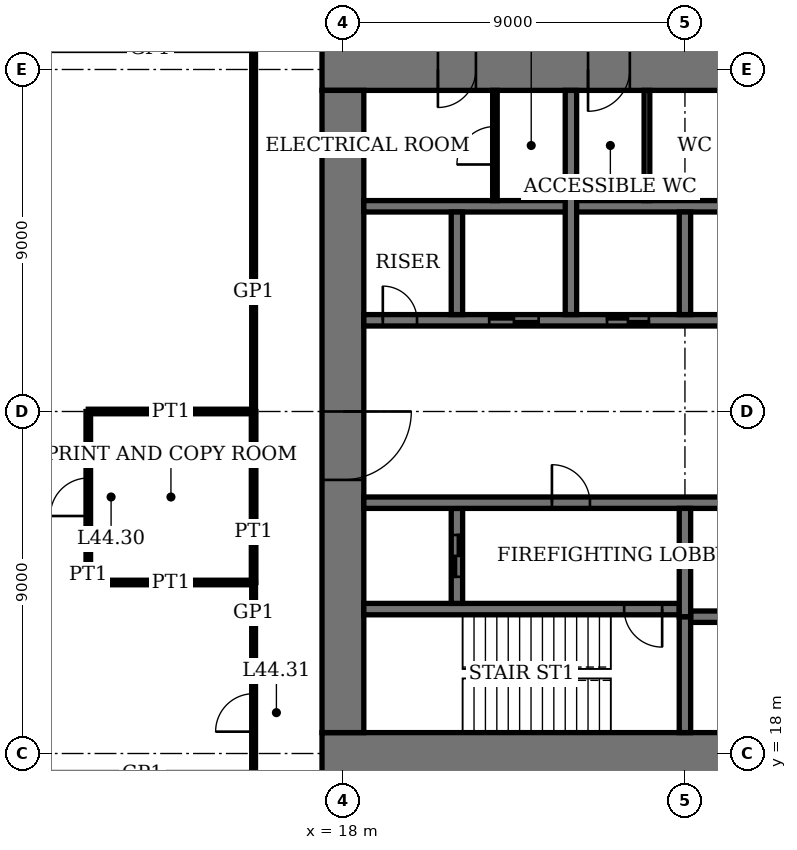
"""IFC4 building model, lengths in metres.
Left out: names, types, materials, properties, quantities, classifications, styles, units other than length and angle.
Written with IfcOpenShell. Run it as: python <this file> out.ifc"""

import sys

from ifc_helpers import new_model, si_unit, direction, frame, frame_2d, origin, place, context, subcontext, project, spatial, rectangle, extrude, element, fill, save


model = new_model("IFC4")
c1 = context("Model", 3, precision=1e-05, world=origin(), true_north=direction((0.0, 1.0)))
c2 = subcontext(c1, "Body", "Model", "MODEL_VIEW")
j1 = project(units=[si_unit("LENGTHUNIT", "METRE"), si_unit("PLANEANGLEUNIT", "RADIAN")], contexts=[c1])
p1 = place(None, origin())
s1 = spatial("IfcSite", under=j1, at=p1, CompositionType="ELEMENT")
p2 = place(p1, origin())
s2 = spatial("IfcBuilding", under=s1, at=p2, CompositionType="ELEMENT")
p3 = place(p2, frame((0.0, 0.0, 182.2)))
s3 = spatial("IfcBuildingStorey", under=s2, at=p3, CompositionType="ELEMENT", Elevation=182.2)
p4 = place(p3, frame((17.45, 18.0, 0.0), z_axis=(0.0, 0.0, 1.0), x_axis=(1.0, 0.0, 0.0)))
e1 = element("IfcWall", 1, at=p4, inside=s3, PredefinedType="SHEAR", context=c2, shape_type="SweptSolid", body=[
    extrude(rectangle(XDim=28.1, YDim=1.1, at=frame_2d((14.05, 0.0))), origin(), (0.0, 0.0, 1.0), 4.0),
])
p5 = place(p4, frame((11.55, 0.0, 0.0)))
e2 = element("IfcOpeningElement", 2, at=p5, cuts=e1, PredefinedType="OPENING", context=c2, shape_type="SweptSolid", body=[
    extrude(rectangle(XDim=1.0, YDim=2.4, at=frame_2d((0.5, 1.2))), frame((0.0, 0.56, 0.0), z_axis=(0.0, -1.0, 0.0), x_axis=(1.0, 0.0, 0.0)), (0.0, 0.0, 1.0), 1.12),
])
p6 = place(p4, frame((16.55, 0.0, 0.0)))
e3 = element("IfcOpeningElement", 3, at=p6, cuts=e1, PredefinedType="OPENING", context=c2, shape_type="SweptSolid", body=[
    extrude(rectangle(XDim=1.0, YDim=2.4, at=frame_2d((0.5, 1.2))), frame((0.0, 0.56, 0.0), z_axis=(0.0, -1.0, 0.0), x_axis=(1.0, 0.0, 0.0)), (0.0, 0.0, 1.0), 1.12),
])
p7 = place(p4, frame((20.0, 0.0, 0.0)))
e4 = element("IfcOpeningElement", 4, at=p7, cuts=e1, PredefinedType="OPENING", context=c2, shape_type="SweptSolid", body=[
    extrude(rectangle(XDim=1.1, YDim=2.4, at=frame_2d((0.55, 1.2))), frame((0.0, 0.56, 0.0), z_axis=(0.0, -1.0, 0.0), x_axis=(1.0, 0.0, 0.0)), (0.0, 0.0, 1.0), 1.12),
])
p8 = place(p4, frame((24.05, 0.0, 0.0)))
e5 = element("IfcOpeningElement", 5, at=p8, cuts=e1, PredefinedType="OPENING", context=c2, shape_type="SweptSolid", body=[
    extrude(rectangle(XDim=1.0, YDim=2.4, at=frame_2d((0.5, 1.2))), frame((0.0, 0.56, 0.0), z_axis=(0.0, -1.0, 0.0), x_axis=(1.0, 0.0, 0.0)), (0.0, 0.0, 1.0), 1.12),
])
p9 = place(p3, frame((45.55, 36.0, 0.0), z_axis=(0.0, 0.0, 1.0), x_axis=(-1.0, 0.0, 0.0)))
e6 = element("IfcWall", 6, at=p9, inside=s3, PredefinedType="SHEAR", context=c2, shape_type="SweptSolid", body=[
    extrude(rectangle(XDim=28.1, YDim=1.1, at=frame_2d((14.05, 0.0))), origin(), (0.0, 0.0, 1.0), 4.0),
])
p10 = place(p9, frame((11.55, 0.0, 0.0)))
e7 = element("IfcOpeningElement", 7, at=p10, cuts=e6, PredefinedType="OPENING", context=c2, shape_type="SweptSolid", body=[
    extrude(rectangle(XDim=1.0, YDim=2.4, at=frame_2d((0.5, 1.2))), frame((0.0, 0.56, 0.0), z_axis=(0.0, -1.0, 0.0), x_axis=(1.0, 0.0, 0.0)), (0.0, 0.0, 1.0), 1.12),
])
p11 = place(p9, frame((16.55, 0.0, 0.0)))
e8 = element("IfcOpeningElement", 8, at=p11, cuts=e6, PredefinedType="OPENING", context=c2, shape_type="SweptSolid", body=[
    extrude(rectangle(XDim=1.0, YDim=2.4, at=frame_2d((0.5, 1.2))), frame((0.0, 0.56, 0.0), z_axis=(0.0, -1.0, 0.0), x_axis=(1.0, 0.0, 0.0)), (0.0, 0.0, 1.0), 1.12),
])
p12 = place(p9, frame((20.0, 0.0, 0.0)))
e9 = element("IfcOpeningElement", 9, at=p12, cuts=e6, PredefinedType="OPENING", context=c2, shape_type="SweptSolid", body=[
    extrude(rectangle(XDim=1.1, YDim=2.4, at=frame_2d((0.55, 1.2))), frame((0.0, 0.56, 0.0), z_axis=(0.0, -1.0, 0.0), x_axis=(1.0, 0.0, 0.0)), (0.0, 0.0, 1.0), 1.12),
])
p13 = place(p9, frame((24.05, 0.0, 0.0)))
e10 = element("IfcOpeningElement", 10, at=p13, cuts=e6, PredefinedType="OPENING", context=c2, shape_type="SweptSolid", body=[
    extrude(rectangle(XDim=1.0, YDim=2.4, at=frame_2d((0.5, 1.2))), frame((0.0, 0.56, 0.0), z_axis=(0.0, -1.0, 0.0), x_axis=(1.0, 0.0, 0.0)), (0.0, 0.0, 1.0), 1.12),
])
p14 = place(p3, frame((18.0, 35.45, 0.0), z_axis=(0.0, 0.0, 1.0), x_axis=(0.0, -1.0, 0.0)))
e11 = element("IfcWall", 11, at=p14, inside=s3, PredefinedType="SHEAR", context=c2, shape_type="SweptSolid", body=[
    extrude(rectangle(XDim=16.9, YDim=1.1, at=frame_2d((8.45, 0.0))), origin(), (0.0, 0.0, 1.0), 4.0),
])
p15 = place(p14, frame((8.45, 0.0, 0.0)))
e12 = element("IfcOpeningElement", 12, at=p15, cuts=e11, PredefinedType="OPENING", context=c2, shape_type="SweptSolid", body=[
    extrude(rectangle(XDim=1.8, YDim=2.4, at=frame_2d((0.9, 1.2))), frame((0.0, 0.56, 0.0), z_axis=(0.0, -1.0, 0.0), x_axis=(1.0, 0.0, 0.0)), (0.0, 0.0, 1.0), 1.12),
])
p16 = place(p3, frame((18.55, 21.8, 0.0), z_axis=(0.0, 0.0, 1.0), x_axis=(1.0, 0.0, 0.0)))
e13 = element("IfcWall", 13, at=p16, inside=s3, PredefinedType="SHEAR", context=c2, shape_type="SweptSolid", body=[
    extrude(rectangle(XDim=8.3, YDim=0.3, at=frame_2d((4.15, 0.0))), origin(), (0.0, 0.0, 1.0), 4.0),
])
p17 = place(p16, frame((6.85, 0.0, 0.0)))
e14 = element("IfcOpeningElement", 14, at=p17, cuts=e13, PredefinedType="OPENING", context=c2, shape_type="SweptSolid", body=[
    extrude(rectangle(XDim=1.0, YDim=2.4, at=frame_2d((0.5, 1.2))), frame((0.0, 0.16, 0.0), z_axis=(0.0, -1.0, 0.0), x_axis=(1.0, 0.0, 0.0)), (0.0, 0.0, 1.0), 0.32),
])
p18 = place(p3, frame((27.0, 18.55, 0.0), z_axis=(0.0, 0.0, 1.0), x_axis=(0.0, 1.0, 0.0)))
e15 = element("IfcWall", 15, at=p18, inside=s3, PredefinedType="SHEAR", context=c2, shape_type="SweptSolid", body=[
    extrude(rectangle(XDim=3.05, YDim=0.3, at=frame_2d((1.525, 0.0))), origin(), (0.0, 0.0, 1.0), 4.0),
])
p19 = place(p3, frame((21.0, 21.95, 0.0), z_axis=(0.0, 0.0, 1.0), x_axis=(0.0, 1.0, 0.0)))
e16 = element("IfcWall", 16, at=p19, inside=s3, PredefinedType="SHEAR", context=c2, shape_type="SweptSolid", body=[
    extrude(rectangle(XDim=2.5, YDim=0.3, at=frame_2d((1.25, 0.0))), origin(), (0.0, 0.0, 1.0), 4.0),
])
p20 = place(p19, frame((0.7, 0.0, 0.0)))
e17 = element("IfcOpeningElement", 17, at=p20, cuts=e16, PredefinedType="OPENING", context=c2, shape_type="SweptSolid", body=[
    extrude(rectangle(XDim=1.1, YDim=2.4, at=frame_2d((0.55, 1.2))), frame((0.0, 0.16, 0.0), z_axis=(0.0, -1.0, 0.0), x_axis=(1.0, 0.0, 0.0)), (0.0, 0.0, 1.0), 0.32),
])
p21 = place(p3, frame((18.55, 24.6, 0.0), z_axis=(0.0, 0.0, 1.0), x_axis=(1.0, 0.0, 0.0)))
e18 = element("IfcWall", 18, at=p21, inside=s3, PredefinedType="SHEAR", context=c2, shape_type="SweptSolid", body=[
    extrude(rectangle(XDim=25.9, YDim=0.3, at=frame_2d((12.95, 0.0))), origin(), (0.0, 0.0, 1.0), 4.0),
])
p22 = place(p21, frame((4.95, 0.0, 0.0)))
e19 = element("IfcOpeningElement", 19, at=p22, cuts=e18, PredefinedType="OPENING", context=c2, shape_type="SweptSolid", body=[
    extrude(rectangle(XDim=1.0, YDim=2.4, at=frame_2d((0.5, 1.2))), frame((0.0, 0.16, 0.0), z_axis=(0.0, -1.0, 0.0), x_axis=(1.0, 0.0, 0.0)), (0.0, 0.0, 1.0), 0.32),
])
p23 = place(p21, frame((24.5, 0.0, 0.0)))
e20 = element("IfcOpeningElement", 20, at=p23, cuts=e18, PredefinedType="OPENING", context=c2, shape_type="SweptSolid", body=[
    extrude(rectangle(XDim=0.9, YDim=2.1, at=frame_2d((0.45, 1.05))), frame((0.0, 0.16, 0.0), z_axis=(0.0, -1.0, 0.0), x_axis=(1.0, 0.0, 0.0)), (0.0, 0.0, 1.0), 0.32),
])
p24 = place(p21, frame((21.3, 0.0, 0.0)))
e21 = element("IfcOpeningElement", 21, at=p24, cuts=e18, PredefinedType="OPENING", context=c2, shape_type="SweptSolid", body=[
    extrude(rectangle(XDim=1.3, YDim=2.4, at=frame_2d((0.65, 1.2))), frame((0.0, 0.16, 0.0), z_axis=(0.0, -1.0, 0.0), x_axis=(1.0, 0.0, 0.0)), (0.0, 0.0, 1.0), 0.32),
])
p25 = place(p3, frame((18.55, 29.4, 0.0), z_axis=(0.0, 0.0, 1.0), x_axis=(1.0, 0.0, 0.0)))
e22 = element("IfcWall", 22, at=p25, inside=s3, PredefinedType="SHEAR", context=c2, shape_type="SweptSolid", body=[
    extrude(rectangle(XDim=25.9, YDim=0.3, at=frame_2d((12.95, 0.0))), origin(), (0.0, 0.0, 1.0), 4.0),
])
p26 = place(p25, frame((19.95, 0.0, 0.0)))
e23 = element("IfcOpeningElement", 23, at=p26, cuts=e22, PredefinedType="OPENING", context=c2, shape_type="SweptSolid", body=[
    extrude(rectangle(XDim=1.0, YDim=2.4, at=frame_2d((0.5, 1.2))), frame((0.0, 0.16, 0.0), z_axis=(0.0, -1.0, 0.0), x_axis=(1.0, 0.0, 0.0)), (0.0, 0.0, 1.0), 0.32),
])
p27 = place(p25, frame((0.5, 0.0, 0.0)))
e24 = element("IfcOpeningElement", 24, at=p27, cuts=e22, PredefinedType="OPENING", context=c2, shape_type="SweptSolid", body=[
    extrude(rectangle(XDim=0.9, YDim=2.1, at=frame_2d((0.45, 1.05))), frame((0.0, 0.16, 0.0), z_axis=(0.0, -1.0, 0.0), x_axis=(1.0, 0.0, 0.0)), (0.0, 0.0, 1.0), 0.32),
])
p28 = place(p25, frame((15.45, 0.0, 0.0)))
e25 = element("IfcOpeningElement", 25, at=p28, cuts=e22, PredefinedType="OPENING", context=c2, shape_type="SweptSolid", body=[
    extrude(rectangle(XDim=1.0, YDim=2.4, at=frame_2d((0.5, 1.2))), frame((0.0, 0.16, 0.0), z_axis=(0.0, -1.0, 0.0), x_axis=(1.0, 0.0, 0.0)), (0.0, 0.0, 1.0), 0.32),
])
p29 = place(p25, frame((12.45, 0.0, 0.0)))
e26 = element("IfcOpeningElement", 26, at=p29, cuts=e22, PredefinedType="OPENING", context=c2, shape_type="SweptSolid", body=[
    extrude(rectangle(XDim=1.0, YDim=2.4, at=frame_2d((0.5, 1.2))), frame((0.0, 0.16, 0.0), z_axis=(0.0, -1.0, 0.0), x_axis=(1.0, 0.0, 0.0)), (0.0, 0.0, 1.0), 0.32),
])
p30 = place(p25, frame((9.4, 0.0, 0.0)))
e27 = element("IfcOpeningElement", 27, at=p30, cuts=e22, PredefinedType="OPENING", context=c2, shape_type="SweptSolid", body=[
    extrude(rectangle(XDim=1.1, YDim=2.4, at=frame_2d((0.55, 1.2))), frame((0.0, 0.16, 0.0), z_axis=(0.0, -1.0, 0.0), x_axis=(1.0, 0.0, 0.0)), (0.0, 0.0, 1.0), 0.32),
])
p31 = place(p25, frame((6.4, 0.0, 0.0)))
e28 = element("IfcOpeningElement", 28, at=p31, cuts=e22, PredefinedType="OPENING", context=c2, shape_type="SweptSolid", body=[
    extrude(rectangle(XDim=1.1, YDim=2.4, at=frame_2d((0.55, 1.2))), frame((0.0, 0.16, 0.0), z_axis=(0.0, -1.0, 0.0), x_axis=(1.0, 0.0, 0.0)), (0.0, 0.0, 1.0), 0.32),
])
p32 = place(p25, frame((3.3, 0.0, 0.0)))
e29 = element("IfcOpeningElement", 29, at=p32, cuts=e22, PredefinedType="OPENING", context=c2, shape_type="SweptSolid", body=[
    extrude(rectangle(XDim=1.3, YDim=2.4, at=frame_2d((0.65, 1.2))), frame((0.0, 0.16, 0.0), z_axis=(0.0, -1.0, 0.0), x_axis=(1.0, 0.0, 0.0)), (0.0, 0.0, 1.0), 0.32),
])
for number, where, z_axis, x_axis in (
    (30, (27.15, 21.6, 0.0), (0.0, 0.0, 1.0), (1.0, 0.0, 0.0)),
    (31, (18.55, 32.4, 0.0), (0.0, 0.0, 1.0), (1.0, 0.0, 0.0)),
):
    element("IfcWall", number, at=place(p3, frame(where, z_axis=z_axis, x_axis=x_axis)), inside=s3, PredefinedType="SHEAR", context=c2, shape_type="SweptSolid", body=[
        extrude(rectangle(XDim=17.3, YDim=0.3, at=frame_2d((8.65, 0.0))), origin(), (0.0, 0.0, 1.0), 4.0),
    ])
p33 = place(p3, frame((27.0, 29.55, 0.0), z_axis=(0.0, 0.0, 1.0), x_axis=(0.0, 1.0, 0.0)))
e32 = element("IfcWall", 32, at=p33, inside=s3, PredefinedType="SHEAR", context=c2, shape_type="SweptSolid", body=[
    extrude(rectangle(XDim=2.7, YDim=0.3, at=frame_2d((1.35, 0.0))), origin(), (0.0, 0.0, 1.0), 4.0),
])
p34 = place(p3, frame((24.0, 29.55, 0.0), z_axis=(0.0, 0.0, 1.0), x_axis=(0.0, 1.0, 0.0)))
e33 = element("IfcWall", 33, at=p34, inside=s3, PredefinedType="SHEAR", context=c2, shape_type="SweptSolid", body=[
    extrude(rectangle(XDim=5.9, YDim=0.3, at=frame_2d((2.95, 0.0))), origin(), (0.0, 0.0, 1.0), 4.0),
])
p35 = place(p3, frame((21.0, 29.55, 0.0), z_axis=(0.0, 0.0, 1.0), x_axis=(0.0, 1.0, 0.0)))
e34 = element("IfcWall", 34, at=p35, inside=s3, PredefinedType="SHEAR", context=c2, shape_type="SweptSolid", body=[
    extrude(rectangle(XDim=2.7, YDim=0.3, at=frame_2d((1.35, 0.0))), origin(), (0.0, 0.0, 1.0), 4.0),
])
p36 = place(p3, frame((27.0, 21.6, 0.0), z_axis=(0.0, 0.0, 1.0), x_axis=(0.0, 1.0, 0.0)))
e35 = element("IfcWall", 35, at=p36, inside=s3, PredefinedType="SHEAR", context=c2, shape_type="SweptSolid", body=[
    extrude(rectangle(XDim=2.85, YDim=0.3, at=frame_2d((1.425, 0.0))), origin(), (0.0, 0.0, 1.0), 4.0),
])
p37 = place(p3, frame((11.3, 22.5, 0.0), z_axis=(0.0, 0.0, 1.0), x_axis=(1.0, 0.0, 0.0)))
e36 = element("IfcWall", 36, at=p37, inside=s3, PredefinedType="PARTITIONING", context=c2, shape_type="SweptSolid", body=[
    extrude(rectangle(XDim=4.35, YDim=0.12, at=frame_2d((2.175, 0.0))), origin(), (0.0, 0.0, 1.0), 3.1),
])
p38 = place(p3, frame((11.3, 27.0, 0.0), z_axis=(0.0, 0.0, 1.0), x_axis=(1.0, 0.0, 0.0)))
e37 = element("IfcWall", 37, at=p38, inside=s3, PredefinedType="PARTITIONING", context=c2, shape_type="SweptSolid", body=[
    extrude(rectangle(XDim=4.35, YDim=0.12, at=frame_2d((2.175, 0.0))), origin(), (0.0, 0.0, 1.0), 3.05),
])
p39 = place(p3, frame((11.3, 22.5, 0.0), z_axis=(0.0, 0.0, 1.0), x_axis=(0.0, 1.0, 0.0)))
e38 = element("IfcWall", 38, at=p39, inside=s3, PredefinedType="PARTITIONING", context=c2, shape_type="SweptSolid", body=[
    extrude(rectangle(XDim=4.5, YDim=0.12, at=frame_2d((2.25, 0.0))), origin(), (0.0, 0.0, 1.0), 3.75),
])
p40 = place(p39, frame((1.75, 0.0, 0.0)))
e39 = element("IfcOpeningElement", 39, at=p40, cuts=e38, PredefinedType="OPENING", context=c2, shape_type="SweptSolid", body=[
    extrude(rectangle(XDim=1.0, YDim=2.4, at=frame_2d((0.5, 1.2))), frame((0.0, 0.07, 0.0), z_axis=(0.0, -1.0, 0.0), x_axis=(1.0, 0.0, 0.0)), (0.0, 0.0, 1.0), 0.14),
])
p41 = place(p3, frame((15.65, 22.5, 0.0), z_axis=(0.0, 0.0, 1.0), x_axis=(0.0, 1.0, 0.0)))
e40 = element("IfcWall", 40, at=p41, inside=s3, PredefinedType="PARTITIONING", context=c2, shape_type="SweptSolid", body=[
    extrude(rectangle(XDim=4.5, YDim=0.12, at=frame_2d((2.25, 0.0))), origin(), (0.0, 0.0, 1.0), 3.75),
])
p42 = place(p3, frame((15.65, 15.65, 0.0), z_axis=(0.0, 0.0, 1.0), x_axis=(0.0, 1.0, 0.0)))
e41 = element("IfcWall", 41, at=p42, inside=s3, PredefinedType="PARTITIONING", context=c2, shape_type="SweptSolid", body=[
    extrude(rectangle(XDim=6.85, YDim=0.1, at=frame_2d((3.425, 0.0))), origin(), (0.0, 0.0, 1.0), 3.75),
])
p43 = place(p42, frame((2.925, 0.0, 0.0)))
e42 = element("IfcOpeningElement", 42, at=p43, cuts=e41, PredefinedType="OPENING", context=c2, shape_type="SweptSolid", body=[
    extrude(rectangle(XDim=1.0, YDim=2.4, at=frame_2d((0.5, 1.2))), frame((0.0, 0.06, 0.0), z_axis=(0.0, -1.0, 0.0), x_axis=(1.0, 0.0, 0.0)), (0.0, 0.0, 1.0), 0.12),
])
p44 = place(p3, frame((15.65, 27.0, 0.0), z_axis=(0.0, 0.0, 1.0), x_axis=(0.0, 1.0, 0.0)))
e43 = element("IfcWall", 43, at=p44, inside=s3, PredefinedType="PARTITIONING", context=c2, shape_type="SweptSolid", body=[
    extrude(rectangle(XDim=11.35, YDim=0.1, at=frame_2d((5.675, 0.0))), origin(), (0.0, 0.0, 1.0), 3.75),
])
p45 = place(p3, frame((26.0, 32.55, 0.0), z_axis=(0.0, 0.0, 1.0), x_axis=(0.0, 1.0, 0.0)))
e44 = element("IfcWall", 44, at=p45, inside=s3, PredefinedType="PARTITIONING", context=c2, shape_type="SweptSolid", body=[
    extrude(rectangle(XDim=2.9, YDim=0.15, at=frame_2d((1.45, 0.0))), origin(), (0.0, 0.0, 1.0), 3.75),
])
p46 = place(p3, frame((22.0, 32.55, 0.0), z_axis=(0.0, 0.0, 1.0), x_axis=(0.0, 1.0, 0.0)))
e45 = element("IfcWall", 45, at=p46, inside=s3, PredefinedType="PARTITIONING", context=c2, shape_type="SweptSolid", body=[
    extrude(rectangle(XDim=2.9, YDim=0.12, at=frame_2d((1.45, 0.0))), origin(), (0.0, 0.0, 1.0), 3.75),
])
p47 = place(p46, frame((0.95, 0.0, 0.0)))
e46 = element("IfcOpeningElement", 46, at=p47, cuts=e45, PredefinedType="OPENING", context=c2, shape_type="SweptSolid", body=[
    extrude(rectangle(XDim=1.0, YDim=2.4, at=frame_2d((0.5, 1.2))), frame((0.0, 0.07, 0.0), z_axis=(0.0, -1.0, 0.0), x_axis=(1.0, 0.0, 0.0)), (0.0, 0.0, 1.0), 0.14),
])
p48 = place(p15, origin())
e47 = element("IfcDoor", 47, at=p48, inside=s3, OperationType="DOUBLE_DOOR_DOUBLE_SWING", PredefinedType="DOOR", context=c2, shape_type="SweptSolid", body=[
    extrude(rectangle(XDim=1.8, YDim=2.4, at=frame_2d((0.9, 1.2))), frame((0.0, 0.03, 0.0), z_axis=(0.0, -1.0, 0.0), x_axis=(1.0, 0.0, 0.0)), (0.0, 0.0, 1.0), 0.06),
    extrude(rectangle(XDim=0.04, YDim=2.4, at=frame_2d((0.02, 1.2))), frame((0.0, 0.55, 0.0), z_axis=(0.0, -1.0, 0.0), x_axis=(1.0, 0.0, 0.0)), (0.0, 0.0, 1.0), 1.1),
    extrude(rectangle(XDim=0.04, YDim=2.4, at=frame_2d((1.78, 1.2))), frame((0.0, 0.55, 0.0), z_axis=(0.0, -1.0, 0.0), x_axis=(1.0, 0.0, 0.0)), (0.0, 0.0, 1.0), 1.1),
    extrude(rectangle(XDim=1.8, YDim=0.04, at=frame_2d((0.9, 2.38))), frame((0.0, 0.55, 0.0), z_axis=(0.0, -1.0, 0.0), x_axis=(1.0, 0.0, 0.0)), (0.0, 0.0, 1.0), 1.1),
])
fill(e12, e47)
p49 = place(p12, origin())
e48 = element("IfcDoor", 48, at=p49, inside=s3, OperationType="SINGLE_SWING_LEFT", PredefinedType="DOOR", context=c2, shape_type="SweptSolid", body=[
    extrude(rectangle(XDim=1.1, YDim=2.4, at=frame_2d((0.55, 1.2))), frame((0.0, 0.025, 0.0), z_axis=(0.0, -1.0, 0.0), x_axis=(1.0, 0.0, 0.0)), (0.0, 0.0, 1.0), 0.05),
    extrude(rectangle(XDim=0.04, YDim=2.4, at=frame_2d((0.02, 1.2))), frame((0.0, 0.44, 0.0), z_axis=(0.0, -1.0, 0.0), x_axis=(1.0, 0.0, 0.0)), (0.0, 0.0, 1.0), 0.88),
    extrude(rectangle(XDim=0.04, YDim=2.4, at=frame_2d((1.08, 1.2))), frame((0.0, 0.44, 0.0), z_axis=(0.0, -1.0, 0.0), x_axis=(1.0, 0.0, 0.0)), (0.0, 0.0, 1.0), 0.88),
    extrude(rectangle(XDim=1.1, YDim=0.04, at=frame_2d((0.55, 2.38))), frame((0.0, 0.44, 0.0), z_axis=(0.0, -1.0, 0.0), x_axis=(1.0, 0.0, 0.0)), (0.0, 0.0, 1.0), 0.88),
])
fill(e9, e48)
p50 = place(p13, origin())
e49 = element("IfcDoor", 49, at=p50, inside=s3, OperationType="SINGLE_SWING_LEFT", PredefinedType="DOOR", context=c2, shape_type="SweptSolid", body=[
    extrude(rectangle(XDim=1.0, YDim=2.4, at=frame_2d((0.5, 1.2))), frame((0.0, 0.025, 0.0), z_axis=(0.0, -1.0, 0.0), x_axis=(1.0, 0.0, 0.0)), (0.0, 0.0, 1.0), 0.05),
    extrude(rectangle(XDim=0.04, YDim=2.4, at=frame_2d((0.02, 1.2))), frame((0.0, 0.4, 0.0), z_axis=(0.0, -1.0, 0.0), x_axis=(1.0, 0.0, 0.0)), (0.0, 0.0, 1.0), 0.8),
    extrude(rectangle(XDim=0.04, YDim=2.4, at=frame_2d((0.98, 1.2))), frame((0.0, 0.4, 0.0), z_axis=(0.0, -1.0, 0.0), x_axis=(1.0, 0.0, 0.0)), (0.0, 0.0, 1.0), 0.8),
    extrude(rectangle(XDim=1.0, YDim=0.04, at=frame_2d((0.5, 2.38))), frame((0.0, 0.4, 0.0), z_axis=(0.0, -1.0, 0.0), x_axis=(1.0, 0.0, 0.0)), (0.0, 0.0, 1.0), 0.8),
])
fill(e10, e49)
p51 = place(p17, origin())
e50 = element("IfcDoor", 50, at=p51, inside=s3, OperationType="SINGLE_SWING_RIGHT", PredefinedType="DOOR", context=c2, shape_type="SweptSolid", body=[
    extrude(rectangle(XDim=1.0, YDim=2.4, at=frame_2d((0.5, 1.2))), frame((0.0, 0.03, 0.0), z_axis=(0.0, -1.0, 0.0), x_axis=(1.0, 0.0, 0.0)), (0.0, 0.0, 1.0), 0.06),
])
fill(e14, e50)
p52 = place(p22, origin())
e51 = element("IfcDoor", 51, at=p52, inside=s3, OperationType="SINGLE_SWING_RIGHT", PredefinedType="DOOR", context=c2, shape_type="SweptSolid", body=[
    extrude(rectangle(XDim=1.0, YDim=2.4, at=frame_2d((0.5, 1.2))), frame((0.0, 0.03, 0.0), z_axis=(0.0, -1.0, 0.0), x_axis=(1.0, 0.0, 0.0)), (0.0, 0.0, 1.0), 0.06),
])
fill(e19, e51)
p53 = place(p27, origin())
e52 = element("IfcDoor", 52, at=p53, inside=s3, OperationType="SINGLE_SWING_RIGHT", PredefinedType="DOOR", context=c2, shape_type="SweptSolid", body=[
    extrude(rectangle(XDim=0.9, YDim=2.1, at=frame_2d((0.45, 1.05))), frame((0.0, 0.03, 0.0), z_axis=(0.0, -1.0, 0.0), x_axis=(1.0, 0.0, 0.0)), (0.0, 0.0, 1.0), 0.06),
])
fill(e24, e52)
p54 = place(p40, origin())
e53 = element("IfcDoor", 53, at=p54, inside=s3, OperationType="SINGLE_SWING_RIGHT", PredefinedType="DOOR", context=c2, shape_type="SweptSolid", body=[
    extrude(rectangle(XDim=1.0, YDim=2.4, at=frame_2d((0.5, 1.2))), frame((0.0, 0.025, 0.0), z_axis=(0.0, -1.0, 0.0), x_axis=(1.0, 0.0, 0.0)), (0.0, 0.0, 1.0), 0.05),
])
fill(e39, e53)
p55 = place(p43, origin())
e54 = element("IfcDoor", 54, at=p55, inside=s3, OperationType="SINGLE_SWING_RIGHT", PredefinedType="DOOR", context=c2, shape_type="SweptSolid", body=[
    extrude(rectangle(XDim=1.0, YDim=2.4, at=frame_2d((0.5, 1.2))), frame((0.0, 0.02, 0.0), z_axis=(0.0, -1.0, 0.0), x_axis=(1.0, 0.0, 0.0)), (0.0, 0.0, 1.0), 0.04),
])
fill(e42, e54)
p56 = place(p47, origin())
e55 = element("IfcDoor", 55, at=p56, inside=s3, OperationType="SINGLE_SWING_RIGHT", PredefinedType="DOOR", context=c2, shape_type="SweptSolid", body=[
    extrude(rectangle(XDim=1.0, YDim=2.4, at=frame_2d((0.5, 1.2))), frame((0.0, 0.03, 0.0), z_axis=(0.0, -1.0, 0.0), x_axis=(1.0, 0.0, 0.0)), (0.0, 0.0, 1.0), 0.06),
])
fill(e46, e55)
p57 = place(p31, origin())
e56 = element("IfcDoor", 56, at=p57, inside=s3, OperationType="DOUBLE_DOOR_SLIDING", PredefinedType="DOOR", context=c2, shape_type="SweptSolid", body=[
    extrude(rectangle(XDim=1.1, YDim=2.4, at=frame_2d((0.55, 1.2))), frame((0.0, 0.02, 0.0), z_axis=(0.0, -1.0, 0.0), x_axis=(1.0, 0.0, 0.0)), (0.0, 0.0, 1.0), 0.04),
])
fill(e28, e56)
p58 = place(p32, origin())
e57 = element("IfcDoor", 57, at=p58, inside=s3, OperationType="DOUBLE_DOOR_SLIDING", PredefinedType="DOOR", context=c2, shape_type="SweptSolid", body=[
    extrude(rectangle(XDim=1.3, YDim=2.4, at=frame_2d((0.65, 1.2))), frame((0.0, 0.02, 0.0), z_axis=(0.0, -1.0, 0.0), x_axis=(1.0, 0.0, 0.0)), (0.0, 0.0, 1.0), 0.04),
])
fill(e29, e57)
p59 = place(p20, origin())
e58 = element("IfcDoor", 58, at=p59, inside=s3, OperationType="DOUBLE_DOOR_SLIDING", PredefinedType="DOOR", context=c2, shape_type="SweptSolid", body=[
    extrude(rectangle(XDim=1.1, YDim=2.4, at=frame_2d((0.55, 1.2))), frame((0.0, 0.03, 0.0), z_axis=(0.0, -1.0, 0.0), x_axis=(1.0, 0.0, 0.0)), (0.0, 0.0, 1.0), 0.06),
])
fill(e17, e58)
save(model, sys.argv[1])
